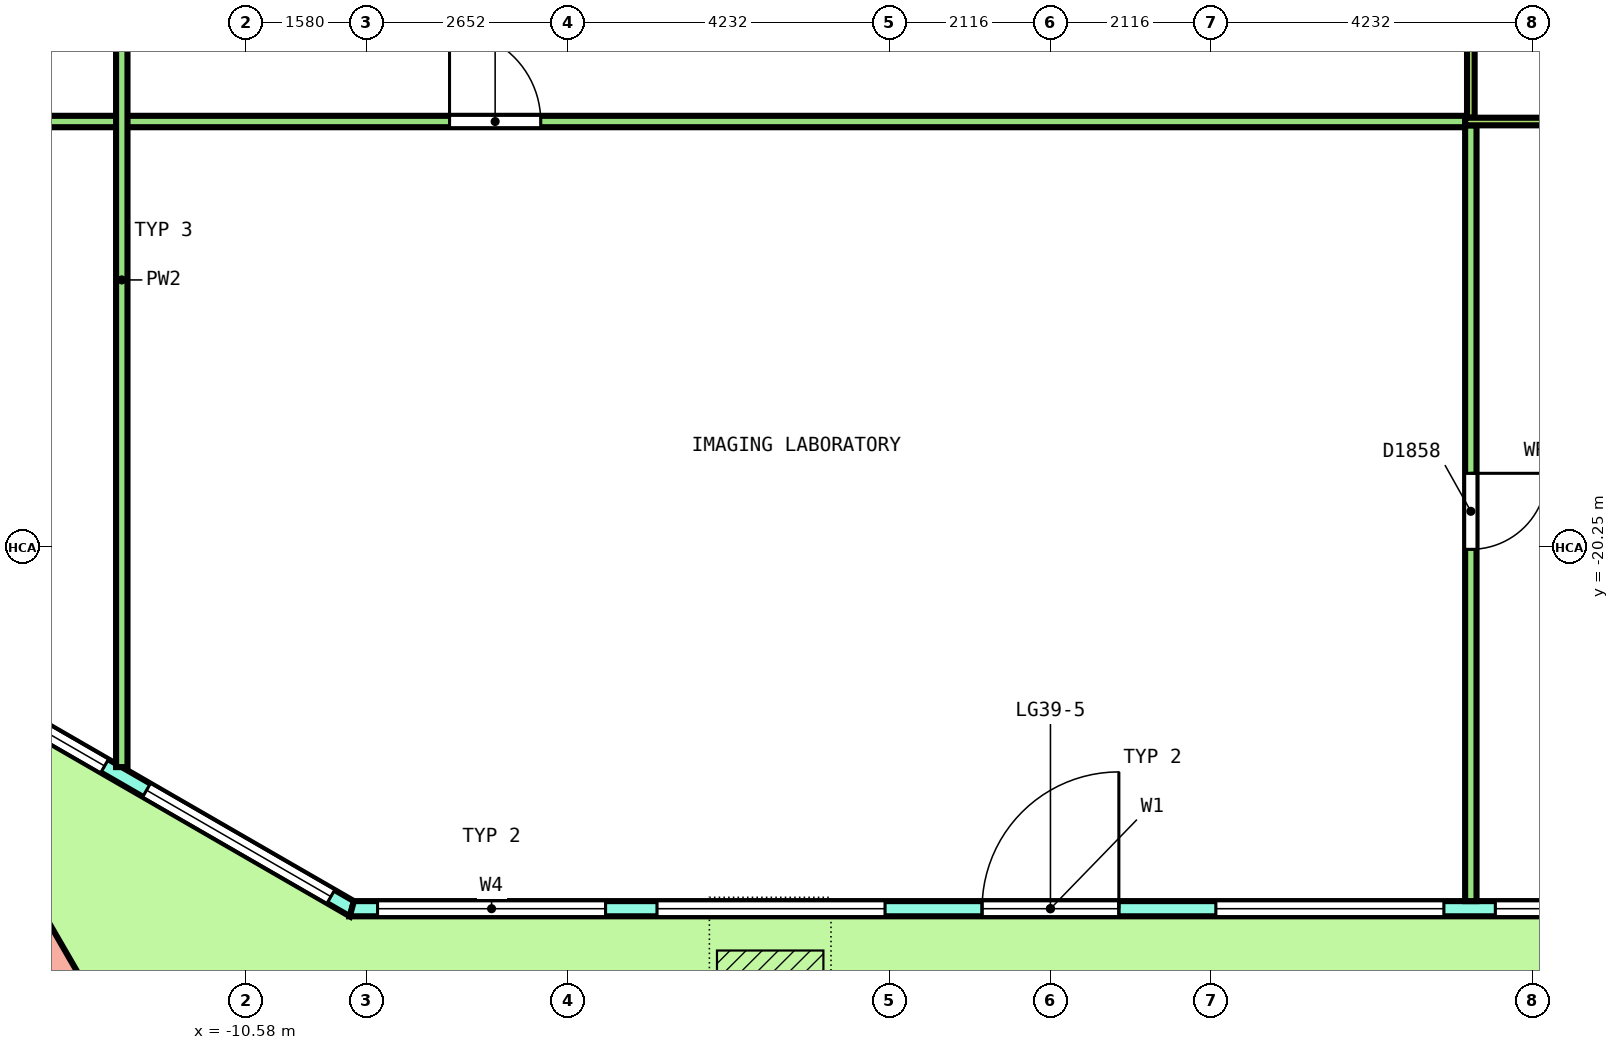
"""IFC4 building model, lengths in metres.
Left out: names, types, materials, properties, quantities, classifications, styles, units other than length and angle.
Written with IfcOpenShell. Run it as: python <this file> out.ifc"""

import sys

from ifc_helpers import new_model, si_unit, direction, frame, frame_2d, origin, origin_2d, place, context, subcontext, project, spatial, polyline, rectangle, outline, extrude, element, fill, save


model = new_model("IFC4")
c1 = context("Model", 3, precision=1e-05, world=origin(), true_north=direction((0.0, 1.0)))
c2 = subcontext(c1, "Body", "Model", "MODEL_VIEW")
j1 = project(units=[si_unit("LENGTHUNIT", "METRE"), si_unit("PLANEANGLEUNIT", "RADIAN")], contexts=[c1])
p1 = place(None, origin())
s1 = spatial("IfcSite", under=j1, at=p1, CompositionType="ELEMENT")
p2 = place(p1, origin())
s2 = spatial("IfcBuilding", under=s1, at=p2, CompositionType="ELEMENT")
p3 = place(p2, frame((0.0, 0.0, 180.4)))
s3 = spatial("IfcBuildingStorey", under=s2, at=p3, CompositionType="ELEMENT", Elevation=180.4)
p4 = place(p3, frame((-13.568, -25.712, 0.0), z_axis=(0.018132630042, -0.031385715123, 0.999342856388), x_axis=(0.866156195426, -0.498787200508, -0.031381104725)))
e1 = element("IfcColumn", 1, at=p4, inside=s3, PredefinedType="COLUMN", context=c2, shape_type="SweptSolid", body=[
    extrude(rectangle(XDim=1.2, YDim=1.2, at=origin_2d()), origin(), (0.0, 0.0, 1.0), 4.053),
])
p5 = place(p3, frame((-15.145, -21.569, 0.0), z_axis=(0.0, 0.0, 1.0), x_axis=(0.866029458321, -0.49999297727, 0.0)))
e2 = element("IfcWall", 2, at=p5, inside=s3, PredefinedType="SOLIDWALL", context=c2, shape_type="SweptSolid", body=[
    extrude(outline(polyline([(-0.027, -0.1), (1.128, -0.1), (2.282, -0.1), (3.437, -0.1), (4.592, -0.1), (5.747, -0.1), (6.901, -0.1), (6.848, 0.1), (5.711, 0.1), (4.574, 0.1), (3.437, 0.1), (2.301, 0.1), (1.164, 0.1), (0.027, 0.1), (-0.027, -0.1)])), origin(), (0.0, 0.0, 1.0), 4.1),
])
p6 = place(p5, frame((0.319, 0.0, 0.1)))
e3 = element("IfcOpeningElement", 3, at=p6, cuts=e2, PredefinedType="OPENING", context=c2, shape_type="SweptSolid", body=[
    extrude(rectangle(XDim=2.8, YDim=2.9, at=frame_2d((1.4, 1.45))), frame((0.0, 0.11, 0.0), z_axis=(0.0, -1.0, 0.0), x_axis=(1.0, 0.0, 0.0)), (0.0, 0.0, 1.0), 0.22),
])
p7 = place(p5, frame((3.756, 0.0, 0.1)))
e4 = element("IfcOpeningElement", 4, at=p7, cuts=e2, PredefinedType="OPENING", context=c2, shape_type="SweptSolid", body=[
    extrude(rectangle(XDim=2.8, YDim=2.9, at=frame_2d((1.4, 1.45))), frame((0.0, 0.11, 0.0), z_axis=(0.0, -1.0, 0.0), x_axis=(1.0, 0.0, 0.0)), (0.0, 0.0, 1.0), 0.22),
])
p8 = place(p3, frame((-9.191, -25.006, 0.0), z_axis=(0.0, 0.0, 1.0), x_axis=(1.0, 0.0, 0.0)))
e5 = element("IfcWall", 5, at=p8, inside=s3, PredefinedType="SOLIDWALL", context=c2, shape_type="SweptSolid", body=[
    extrude(outline(polyline([(-0.027, -0.1), (0.997, -0.1), (2.021, -0.1), (3.046, -0.1), (4.07, -0.1), (5.094, -0.1), (6.118, -0.1), (7.143, -0.1), (8.167, -0.1), (9.191, -0.1), (10.215, -0.1), (11.239, -0.1), (12.263, -0.1), (13.288, -0.1), (14.312, -0.1), (15.336, -0.1), (16.36, -0.1), (17.385, -0.1), (18.409, -0.1), (18.355, 0.1), (17.337, 0.1), (16.319, 0.1), (15.3, 0.1), (14.282, 0.1), (13.264, 0.1), (12.246, 0.1), (11.227, 0.1), (10.209, 0.1), (9.191, 0.1), (8.173, 0.1), (7.155, 0.1), (6.136, 0.1), (5.118, 0.1), (4.1, 0.1), (3.082, 0.1), (2.063, 0.1), (1.045, 0.1), (0.027, 0.1), (-0.027, -0.1)])), origin(), (0.0, 0.0, 1.0), 4.1),
])
p9 = place(p8, frame((0.338, 0.0, 0.1)))
e6 = element("IfcOpeningElement", 6, at=p9, cuts=e5, PredefinedType="OPENING", context=c2, shape_type="SweptSolid", body=[
    extrude(rectangle(XDim=3.0, YDim=2.9, at=frame_2d((1.5, 1.45))), frame((0.0, 0.11, 0.0), z_axis=(0.0, -1.0, 0.0), x_axis=(1.0, 0.0, 0.0)), (0.0, 0.0, 1.0), 0.22),
])
p10 = place(p8, frame((4.015, 0.0, 0.1)))
e7 = element("IfcOpeningElement", 7, at=p10, cuts=e5, PredefinedType="OPENING", context=c2, shape_type="SweptSolid", body=[
    extrude(rectangle(XDim=3.0, YDim=2.9, at=frame_2d((1.5, 1.45))), frame((0.0, 0.11, 0.0), z_axis=(0.0, -1.0, 0.0), x_axis=(1.0, 0.0, 0.0)), (0.0, 0.0, 1.0), 0.22),
])
p11 = place(p8, frame((8.291, 0.0, 0.0)))
e8 = element("IfcOpeningElement", 8, at=p11, cuts=e5, PredefinedType="OPENING", context=c2, shape_type="SweptSolid", body=[
    extrude(rectangle(XDim=1.8, YDim=2.4, at=frame_2d((0.9, 1.2))), frame((0.0, 0.11, 0.0), z_axis=(0.0, -1.0, 0.0), x_axis=(1.0, 0.0, 0.0)), (0.0, 0.0, 1.0), 0.22),
])
p12 = place(p8, frame((8.291, 0.0, 2.55)))
e9 = element("IfcOpeningElement", 9, at=p12, cuts=e5, PredefinedType="OPENING", context=c2, shape_type="SweptSolid", body=[
    extrude(rectangle(XDim=1.8, YDim=0.45, at=frame_2d((0.9, 0.225))), frame((0.0, 0.11, 0.0), z_axis=(0.0, -1.0, 0.0), x_axis=(1.0, 0.0, 0.0)), (0.0, 0.0, 1.0), 0.22),
])
p13 = place(p8, frame((11.367, 0.0, 0.1)))
e10 = element("IfcOpeningElement", 10, at=p13, cuts=e5, PredefinedType="OPENING", context=c2, shape_type="SweptSolid", body=[
    extrude(rectangle(XDim=3.0, YDim=2.9, at=frame_2d((1.5, 1.45))), frame((0.0, 0.11, 0.0), z_axis=(0.0, -1.0, 0.0), x_axis=(1.0, 0.0, 0.0)), (0.0, 0.0, 1.0), 0.22),
])
p14 = place(p8, frame((15.044, 0.0, 0.1)))
e11 = element("IfcOpeningElement", 11, at=p14, cuts=e5, PredefinedType="OPENING", context=c2, shape_type="SweptSolid", body=[
    extrude(rectangle(XDim=3.0, YDim=2.9, at=frame_2d((1.5, 1.45))), frame((0.0, 0.11, 0.0), z_axis=(0.0, -1.0, 0.0), x_axis=(1.0, 0.0, 0.0)), (0.0, 0.0, 1.0), 0.22),
])
p15 = place(p3, frame((-19.024, -14.65, 0.0), z_axis=(0.0, 0.0, 1.0), x_axis=(1.0, 0.0, 0.0)))
e12 = element("IfcWall", 12, at=p15, inside=s3, PredefinedType="PARTITIONING", context=c2, shape_type="SweptSolid", body=[
    extrude(rectangle(XDim=24.479, YDim=0.15, at=frame_2d((12.24, 0.0))), origin(), (0.0, 0.0, 1.0), 3.05),
])
p16 = place(p15, frame((2.903, 0.0, 0.0)))
e13 = element("IfcOpeningElement", 13, at=p16, cuts=e12, PredefinedType="OPENING", context=c2, shape_type="SweptSolid", body=[
    extrude(rectangle(XDim=1.0, YDim=2.1, at=frame_2d((0.5, 1.05))), frame((0.0, 0.085, 0.0), z_axis=(0.0, -1.0, 0.0), x_axis=(1.0, 0.0, 0.0)), (0.0, 0.0, 1.0), 0.17),
])
p17 = place(p15, frame((11.118, 0.0, 0.0)))
e14 = element("IfcOpeningElement", 14, at=p17, cuts=e12, PredefinedType="OPENING", context=c2, shape_type="SweptSolid", body=[
    extrude(rectangle(XDim=1.2, YDim=2.1, at=frame_2d((0.6, 1.05))), frame((0.0, 0.085, 0.0), z_axis=(0.0, -1.0, 0.0), x_axis=(1.0, 0.0, 0.0)), (0.0, 0.0, 1.0), 0.17),
])
p18 = place(p3, frame((-12.218, -23.143, 0.0), z_axis=(0.0, 0.0, 1.0), x_axis=(0.0, 1.0, 0.0)))
e15 = element("IfcWall", 15, at=p18, inside=s3, PredefinedType="PARTITIONING", context=c2, shape_type="SweptSolid", body=[
    extrude(rectangle(XDim=12.818, YDim=0.15, at=frame_2d((6.409, 0.0))), origin(), (0.0, 0.0, 1.0), 3.05),
])
p19 = place(p3, frame((5.531, -24.906, 0.0), z_axis=(0.0, 0.0, 1.0), x_axis=(0.0, 1.0, 0.0)))
e16 = element("IfcWall", 16, at=p19, inside=s3, PredefinedType="PARTITIONING", context=c2, shape_type="SweptSolid", body=[
    extrude(rectangle(XDim=10.206, YDim=0.15, at=frame_2d((5.103, 0.0))), origin(), (0.0, 0.0, 1.0), 3.05),
])
p20 = place(p19, frame((4.628, 0.0, 0.0)))
e17 = element("IfcOpeningElement", 17, at=p20, cuts=e16, PredefinedType="OPENING", context=c2, shape_type="SweptSolid", body=[
    extrude(rectangle(XDim=1.0, YDim=2.1, at=frame_2d((0.5, 1.05))), frame((0.0, 0.085, 0.0), z_axis=(0.0, -1.0, 0.0), x_axis=(1.0, 0.0, 0.0)), (0.0, 0.0, 1.0), 0.17),
])
p21 = place(p3, frame((5.531, -14.6, 0.0), z_axis=(0.0, 0.0, 1.0), x_axis=(0.0, 1.0, 0.0)))
e18 = element("IfcWall", 18, at=p21, inside=s3, PredefinedType="PARTITIONING", context=c2, shape_type="SweptSolid", body=[
    extrude(rectangle(XDim=4.275, YDim=0.1, at=frame_2d((2.138, 0.0))), origin(), (0.0, 0.0, 1.0), 3.05),
])
p22 = place(p3, frame((5.456, -14.65, 0.0), z_axis=(0.0, 0.0, 1.0), x_axis=(1.0, 0.0, 0.0)))
e19 = element("IfcWall", 19, at=p22, inside=s3, PredefinedType="PARTITIONING", context=c2, shape_type="SweptSolid", body=[
    extrude(rectangle(XDim=3.712, YDim=0.1, at=frame_2d((1.856, 0.0))), origin(), (0.0, 0.0, 1.0), 3.05),
])
p23 = place(p6, origin())
e20 = element("IfcWindow", 20, at=p23, inside=s3, PartitioningType="SINGLE_PANEL", PredefinedType="WINDOW", context=c2, shape_type="SweptSolid", body=[
    extrude(rectangle(XDim=2.8, YDim=2.9, at=frame_2d((1.4, 1.45))), frame((0.0, 0.03, 0.0), z_axis=(0.0, -1.0, 0.0), x_axis=(1.0, 0.0, 0.0)), (0.0, 0.0, 1.0), 0.06),
])
fill(e3, e20)
p24 = place(p7, origin())
e21 = element("IfcWindow", 21, at=p24, inside=s3, PartitioningType="SINGLE_PANEL", PredefinedType="WINDOW", context=c2, shape_type="SweptSolid", body=[
    extrude(rectangle(XDim=2.8, YDim=2.9, at=frame_2d((1.4, 1.45))), frame((0.0, 0.03, 0.0), z_axis=(0.0, -1.0, 0.0), x_axis=(1.0, 0.0, 0.0)), (0.0, 0.0, 1.0), 0.06),
])
fill(e4, e21)
p25 = place(p9, origin())
e22 = element("IfcWindow", 22, at=p25, inside=s3, PartitioningType="SINGLE_PANEL", PredefinedType="WINDOW", context=c2, shape_type="SweptSolid", body=[
    extrude(rectangle(XDim=3.0, YDim=2.9, at=frame_2d((1.5, 1.45))), frame((0.0, 0.03, 0.0), z_axis=(0.0, -1.0, 0.0), x_axis=(1.0, 0.0, 0.0)), (0.0, 0.0, 1.0), 0.06),
])
fill(e6, e22)
p26 = place(p10, origin())
e23 = element("IfcWindow", 23, at=p26, inside=s3, PartitioningType="SINGLE_PANEL", PredefinedType="WINDOW", context=c2, shape_type="SweptSolid", body=[
    extrude(rectangle(XDim=3.0, YDim=2.9, at=frame_2d((1.5, 1.45))), frame((0.0, 0.03, 0.0), z_axis=(0.0, -1.0, 0.0), x_axis=(1.0, 0.0, 0.0)), (0.0, 0.0, 1.0), 0.06),
])
fill(e7, e23)
p27 = place(p11, origin())
e24 = element("IfcDoor", 24, at=p27, inside=s3, OperationType="DOUBLE_DOOR_SINGLE_SWING", PredefinedType="DOOR", context=c2, shape_type="SweptSolid", body=[
    extrude(rectangle(XDim=1.8, YDim=2.4, at=frame_2d((0.9, 1.2))), frame((0.0, 0.025, 0.0), z_axis=(0.0, -1.0, 0.0), x_axis=(1.0, 0.0, 0.0)), (0.0, 0.0, 1.0), 0.05),
])
fill(e8, e24)
p28 = place(p12, origin())
e25 = element("IfcWindow", 25, at=p28, inside=s3, PartitioningType="SINGLE_PANEL", PredefinedType="WINDOW", context=c2, shape_type="SweptSolid", body=[
    extrude(rectangle(XDim=1.8, YDim=0.45, at=frame_2d((0.9, 0.225))), frame((0.0, 0.03, 0.0), z_axis=(0.0, -1.0, 0.0), x_axis=(1.0, 0.0, 0.0)), (0.0, 0.0, 1.0), 0.06),
])
fill(e9, e25)
p29 = place(p13, origin())
e26 = element("IfcWindow", 26, at=p29, inside=s3, PartitioningType="SINGLE_PANEL", PredefinedType="WINDOW", context=c2, shape_type="SweptSolid", body=[
    extrude(rectangle(XDim=3.0, YDim=2.9, at=frame_2d((1.5, 1.45))), frame((0.0, 0.03, 0.0), z_axis=(0.0, -1.0, 0.0), x_axis=(1.0, 0.0, 0.0)), (0.0, 0.0, 1.0), 0.06),
])
fill(e10, e26)
p30 = place(p14, origin())
e27 = element("IfcWindow", 27, at=p30, inside=s3, PartitioningType="SINGLE_PANEL", PredefinedType="WINDOW", context=c2, shape_type="SweptSolid", body=[
    extrude(rectangle(XDim=3.0, YDim=2.9, at=frame_2d((1.5, 1.45))), frame((0.0, 0.03, 0.0), z_axis=(0.0, -1.0, 0.0), x_axis=(1.0, 0.0, 0.0)), (0.0, 0.0, 1.0), 0.06),
])
fill(e11, e27)
p31 = place(p17, origin())
e28 = element("IfcDoor", 28, at=p31, inside=s3, OperationType="DOUBLE_DOOR_SINGLE_SWING", PredefinedType="DOOR", context=c2, shape_type="SweptSolid", body=[
    extrude(rectangle(XDim=1.2, YDim=2.1, at=frame_2d((0.6, 1.05))), frame((0.0, 0.025, 0.0), z_axis=(0.0, -1.0, 0.0), x_axis=(1.0, 0.0, 0.0)), (0.0, 0.0, 1.0), 0.05),
])
fill(e14, e28)
p32 = place(p20, origin())
e29 = element("IfcDoor", 29, at=p32, inside=s3, OperationType="SINGLE_SWING_RIGHT", PredefinedType="DOOR", context=c2, shape_type="SweptSolid", body=[
    extrude(rectangle(XDim=1.0, YDim=2.1, at=frame_2d((0.5, 1.05))), frame((0.0, 0.025, 0.0), z_axis=(0.0, -1.0, 0.0), x_axis=(1.0, 0.0, 0.0)), (0.0, 0.0, 1.0), 0.05),
])
fill(e17, e29)
save(model, sys.argv[1])
